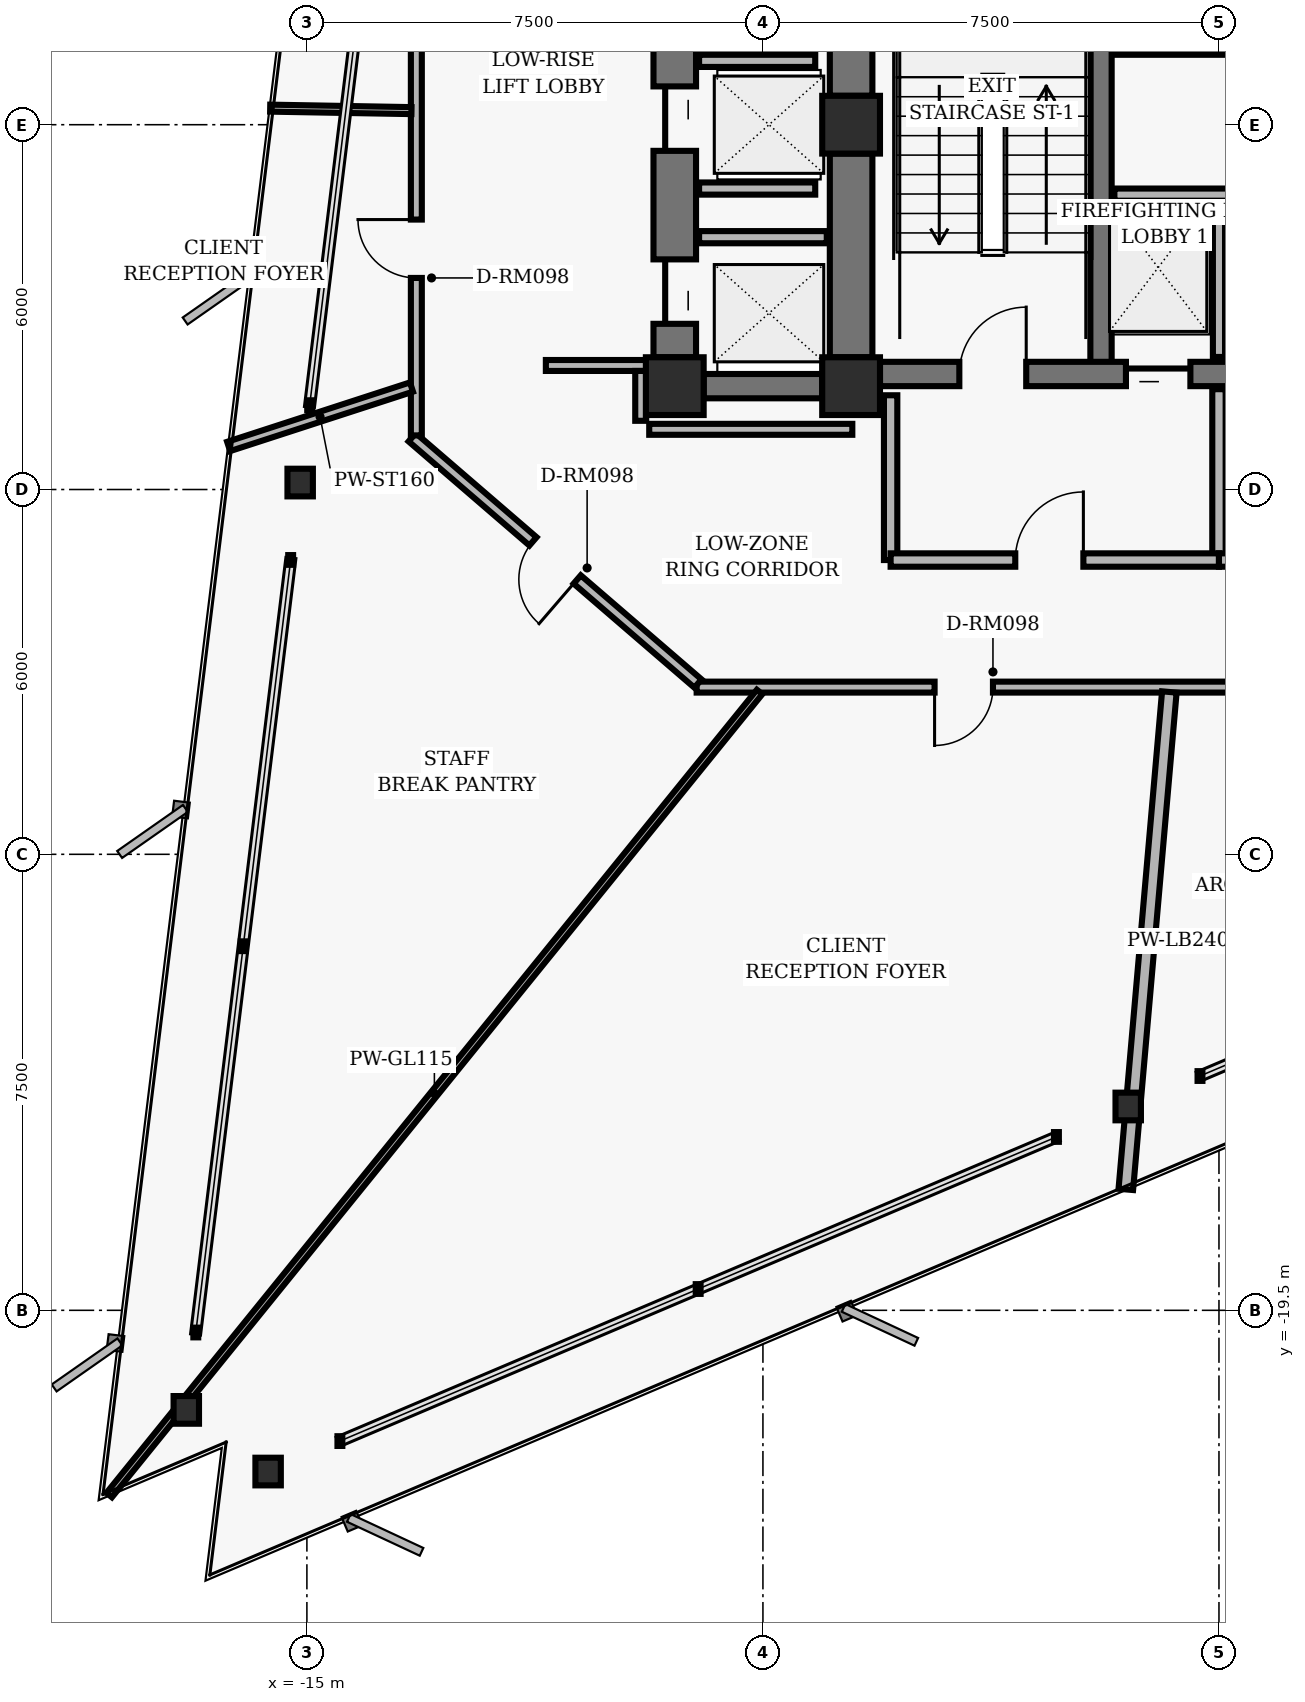
"""IFC4 building model, lengths in metres.
Left out: names, types, materials, properties, quantities, classifications, styles, units other than length and angle.
Written with IfcOpenShell. Run it as: python <this file> out.ifc"""

import sys

from ifc_helpers import new_model, si_unit, direction, frame, frame_2d, origin, origin_2d, place, context, subcontext, project, spatial, rectangle, hollow_rectangle, i_section, extrude, element, fill, save


model = new_model("IFC4")
c1 = context("Model", 3, precision=1e-05, world=origin(), true_north=direction((0.0, 1.0)))
c2 = subcontext(c1, "Body", "Model", "MODEL_VIEW")
j1 = project(units=[si_unit("LENGTHUNIT", "METRE"), si_unit("PLANEANGLEUNIT", "RADIAN")], contexts=[c1])
p1 = place(None, origin())
s1 = spatial("IfcSite", under=j1, at=p1, CompositionType="ELEMENT")
p2 = place(p1, origin())
s2 = spatial("IfcBuilding", under=s1, at=p2, CompositionType="ELEMENT")
p3 = place(p2, frame((0.0, 0.0, 63.04)))
s3 = spatial("IfcBuildingStorey", under=s2, at=p3, CompositionType="ELEMENT", Elevation=63.04)
for number, where, z_axis, x_axis in (
    (1, (-6.05, 0.0, 0.0), (0.0, 0.0, 1.0), (1.0, 0.0, 0.0)),
    (2, (-6.05, -4.3, 0.0), (0.0, 0.0, 1.0), (1.0, 0.0, 0.0)),
    (3, (-8.95, -4.3, 0.0), (0.0, 0.0, 1.0), (1.0, 0.0, 0.0)),
):
    element("IfcColumn", number, at=place(p3, frame(where, z_axis=z_axis, x_axis=x_axis)), inside=s3, PredefinedType="COLUMN", context=c2, shape_type="SweptSolid", body=[
        extrude(hollow_rectangle(XDim=0.95, YDim=0.95, WallThickness=0.06, InnerFilletRadius=0.02, OuterFilletRadius=0.04, at=origin_2d()), origin(), (0.0, 0.0, 1.0), 3.36),
    ])
p4 = place(p3, frame((-6.05, 0.475, 0.0), z_axis=(0.0, 0.0, 1.0), x_axis=(0.0, 1.0, 0.0)))
e4 = element("IfcWall", 4, at=p4, inside=s3, PredefinedType="SHEAR", context=c2, shape_type="SweptSolid", body=[
    extrude(rectangle(XDim=3.55, YDim=0.7, at=frame_2d((1.775, 0.0))), origin(), (0.0, 0.0, 1.0), 3.098),
])
p5 = place(p3, frame((-6.05, -3.825, 0.0), z_axis=(0.0, 0.0, 1.0), x_axis=(0.0, 1.0, 0.0)))
e5 = element("IfcWall", 5, at=p5, inside=s3, PredefinedType="SHEAR", context=c2, shape_type="SweptSolid", body=[
    extrude(rectangle(XDim=3.35, YDim=0.7, at=frame_2d((1.675, 0.0))), origin(), (0.0, 0.0, 1.0), 3.098),
])
p6 = place(p3, frame((-1.94, -4.1, 0.0), z_axis=(0.0, 0.0, 1.0), x_axis=(0.0, 1.0, 0.0)))
e6 = element("IfcWall", 6, at=p6, inside=s3, PredefinedType="SHEAR", context=c2, shape_type="SweptSolid", body=[
    extrude(rectangle(XDim=8.2, YDim=0.35, at=frame_2d((4.1, 0.0))), origin(), (0.0, 0.0, 1.0), 3.098),
])
p7 = place(p3, frame((-5.575, -4.1, 0.0), z_axis=(0.0, 0.0, 1.0), x_axis=(1.0, 0.0, 0.0)))
e7 = element("IfcWall", 7, at=p7, inside=s3, PredefinedType="SHEAR", context=c2, shape_type="SweptSolid", body=[
    extrude(rectangle(XDim=11.15, YDim=0.4, at=frame_2d((5.575, 0.0))), origin(), (0.0, 0.0, 1.0), 3.098),
])
p8 = place(p7, frame((1.305, 0.0, 0.0)))
e8 = element("IfcOpeningElement", 8, at=p8, cuts=e7, PredefinedType="OPENING", context=c2, shape_type="SweptSolid", body=[
    extrude(rectangle(XDim=1.1, YDim=2.04, at=frame_2d((0.55, 1.02))), frame((0.0, 0.21, 0.0), z_axis=(0.0, -1.0, 0.0), x_axis=(1.0, 0.0, 0.0)), (0.0, 0.0, 1.0), 0.42),
])
p9 = place(p7, frame((8.745, 0.0, 0.0)))
e9 = element("IfcOpeningElement", 9, at=p9, cuts=e7, PredefinedType="OPENING", context=c2, shape_type="SweptSolid", body=[
    extrude(rectangle(XDim=1.1, YDim=2.04, at=frame_2d((0.55, 1.02))), frame((0.0, 0.21, 0.0), z_axis=(0.0, -1.0, 0.0), x_axis=(1.0, 0.0, 0.0)), (0.0, 0.0, 1.0), 0.42),
])
p10 = place(p7, frame((4.045, 0.0, 0.0)))
e10 = element("IfcOpeningElement", 10, at=p10, cuts=e7, PredefinedType="OPENING", context=c2, shape_type="SweptSolid", body=[
    extrude(rectangle(XDim=1.06, YDim=2.04, at=frame_2d((0.53, 1.02))), frame((0.0, 0.21, 0.0), z_axis=(0.0, -1.0, 0.0), x_axis=(1.0, 0.0, 0.0)), (0.0, 0.0, 1.0), 0.42),
])
p11 = place(p7, frame((6.045, 0.0, 0.0)))
e11 = element("IfcOpeningElement", 11, at=p11, cuts=e7, PredefinedType="OPENING", context=c2, shape_type="SweptSolid", body=[
    extrude(rectangle(XDim=1.06, YDim=2.04, at=frame_2d((0.53, 1.02))), frame((0.0, 0.21, 0.0), z_axis=(0.0, -1.0, 0.0), x_axis=(1.0, 0.0, 0.0)), (0.0, 0.0, 1.0), 0.42),
])
p12 = place(p3, frame((-8.95, -3.825, 0.0), z_axis=(0.0, 0.0, 1.0), x_axis=(0.0, 1.0, 0.0)))
e12 = element("IfcWall", 12, at=p12, inside=s3, PredefinedType="SHEAR", context=c2, shape_type="SweptSolid", body=[
    extrude(rectangle(XDim=7.85, YDim=0.7, at=frame_2d((3.925, 0.0))), origin(), (0.0, 0.0, 1.0), 3.098),
])
p13 = place(p12, frame((0.55, 0.0, 0.0)))
e13 = element("IfcOpeningElement", 13, at=p13, cuts=e12, PredefinedType="OPENING", context=c2, shape_type="SweptSolid", body=[
    extrude(rectangle(XDim=1.06, YDim=2.04, at=frame_2d((0.53, 1.02))), frame((0.0, 0.36, 0.0), z_axis=(0.0, -1.0, 0.0), x_axis=(1.0, 0.0, 0.0)), (0.0, 0.0, 1.0), 0.72),
])
p14 = place(p12, frame((3.395, 0.0, 0.0)))
e14 = element("IfcOpeningElement", 14, at=p14, cuts=e12, PredefinedType="OPENING", context=c2, shape_type="SweptSolid", body=[
    extrude(rectangle(XDim=1.06, YDim=2.04, at=frame_2d((0.53, 1.02))), frame((0.0, 0.36, 0.0), z_axis=(0.0, -1.0, 0.0), x_axis=(1.0, 0.0, 0.0)), (0.0, 0.0, 1.0), 0.72),
])
p15 = place(p12, frame((6.23, 0.0, 0.0)))
e15 = element("IfcOpeningElement", 15, at=p15, cuts=e12, PredefinedType="OPENING", context=c2, shape_type="SweptSolid", body=[
    extrude(rectangle(XDim=1.06, YDim=2.04, at=frame_2d((0.53, 1.02))), frame((0.0, 0.36, 0.0), z_axis=(0.0, -1.0, 0.0), x_axis=(1.0, 0.0, 0.0)), (0.0, 0.0, 1.0), 0.72),
])
p16 = place(p3, frame((-8.475, -4.3, 0.0), z_axis=(0.0, 0.0, 1.0), x_axis=(1.0, 0.0, 0.0)))
e16 = element("IfcWall", 16, at=p16, inside=s3, PredefinedType="SHEAR", context=c2, shape_type="SweptSolid", body=[
    extrude(rectangle(XDim=1.95, YDim=0.4, at=frame_2d((0.975, 0.0))), origin(), (0.0, 0.0, 1.0), 3.098),
])
for number, where, z_axis, x_axis in (
    (17, (-15.111, -5.886, 0.0), (0.0, 0.0, 1.0), (1.0, 0.0, 0.0)),
    (18, (-16.983, -21.138, 0.0), (0.0, 0.0, 1.0), (1.0, 0.0, 0.0)),
    (19, (-15.638, -22.152, 0.0), (0.0, 0.0, 1.0), (1.0, 0.0, 0.0)),
    (20, (-1.493, -16.148, 0.0), (0.0, 0.0, 1.0), (1.0, 0.0, 0.0)),
):
    element("IfcColumn", number, at=place(p3, frame(where, z_axis=z_axis, x_axis=x_axis)), inside=s3, PredefinedType="COLUMN", context=c2, shape_type="SweptSolid", body=[
        extrude(i_section(OverallWidth=0.418, OverallDepth=0.455, WebThickness=0.042, FlangeThickness=0.068, FilletRadius=0.025, at=origin_2d()), origin(), (0.0, 0.0, 1.0), 3.36),
    ])
p17 = place(p3, frame((0.0, -3.82, 0.0), z_axis=(0.0, 0.0, 1.0), x_axis=(0.0, 1.0, 0.0)))
e21 = element("IfcWall", 21, at=p17, inside=s3, PredefinedType="PARTITIONING", context=c2, shape_type="SweptSolid", body=[
    extrude(rectangle(XDim=2.67, YDim=0.2, at=frame_2d((1.335, 0.0))), origin(), (0.0, 0.0, 1.0), 3.073),
])
p18 = place(p3, frame((-1.72, -1.15, 0.0), z_axis=(0.0, 0.0, 1.0), x_axis=(1.0, 0.0, 0.0)))
e22 = element("IfcWall", 22, at=p18, inside=s3, PredefinedType="PARTITIONING", context=c2, shape_type="SweptSolid", body=[
    extrude(rectangle(XDim=3.44, YDim=0.2, at=frame_2d((1.72, 0.0))), origin(), (0.0, 0.0, 1.0), 3.073),
])
p19 = place(p3, frame((-5.4, -7.16, 0.0), z_axis=(0.0, 0.0, 1.0), x_axis=(0.0, 1.0, 0.0)))
e23 = element("IfcWall", 23, at=p19, inside=s3, PredefinedType="PARTITIONING", context=c2, shape_type="SweptSolid", body=[
    extrude(rectangle(XDim=2.71, YDim=0.22, at=frame_2d((1.355, 0.0))), origin(), (0.0, 0.0, 1.0), 3.073),
])
p20 = place(p3, frame((0.0, -7.16, 0.0), z_axis=(0.0, 0.0, 1.0), x_axis=(0.0, 1.0, 0.0)))
e24 = element("IfcWall", 24, at=p20, inside=s3, PredefinedType="PARTITIONING", context=c2, shape_type="SweptSolid", body=[
    extrude(rectangle(XDim=2.81, YDim=0.22, at=frame_2d((1.405, 0.0))), origin(), (0.0, 0.0, 1.0), 3.073),
])
p21 = place(p3, frame((-5.4, -7.16, 0.0), z_axis=(0.0, 0.0, 1.0), x_axis=(1.0, 0.0, 0.0)))
e25 = element("IfcWall", 25, at=p21, inside=s3, PredefinedType="PARTITIONING", context=c2, shape_type="SweptSolid", body=[
    extrude(rectangle(XDim=5.4, YDim=0.22, at=frame_2d((2.7, 0.0))), origin(), (0.0, 0.0, 1.0), 2.587),
])
p22 = place(p21, frame((2.05, 0.0, 0.0)))
e26 = element("IfcOpeningElement", 26, at=p22, cuts=e25, PredefinedType="OPENING", context=c2, shape_type="SweptSolid", body=[
    extrude(rectangle(XDim=1.12, YDim=2.02, at=frame_2d((0.56, 1.01))), frame((0.0, 0.12, 0.0), z_axis=(0.0, -1.0, 0.0), x_axis=(1.0, 0.0, 0.0)), (0.0, 0.0, 1.0), 0.24),
])
p23 = place(p3, frame((0.0, -7.16, 0.0), z_axis=(0.0, 0.0, 1.0), x_axis=(1.0, 0.0, 0.0)))
e27 = element("IfcWall", 27, at=p23, inside=s3, PredefinedType="PARTITIONING", context=c2, shape_type="SweptSolid", body=[
    extrude(rectangle(XDim=5.4, YDim=0.22, at=frame_2d((2.7, 0.0))), origin(), (0.0, 0.0, 1.0), 2.587),
])
p24 = place(p23, frame((2.05, 0.0, 0.0)))
e28 = element("IfcOpeningElement", 28, at=p24, cuts=e27, PredefinedType="OPENING", context=c2, shape_type="SweptSolid", body=[
    extrude(rectangle(XDim=1.12, YDim=2.02, at=frame_2d((0.56, 1.01))), frame((0.0, 0.12, 0.0), z_axis=(0.0, -1.0, 0.0), x_axis=(1.0, 0.0, 0.0)), (0.0, 0.0, 1.0), 0.24),
])
p25 = place(p3, frame((-1.72, 1.25, 0.0), z_axis=(0.0, 0.0, 1.0), x_axis=(1.0, 0.0, 0.0)))
e29 = element("IfcWall", 29, at=p25, inside=s3, PredefinedType="PARTITIONING", context=c2, shape_type="SweptSolid", body=[
    extrude(rectangle(XDim=3.44, YDim=0.2, at=frame_2d((1.72, 0.0))), origin(), (0.0, 0.0, 1.0), 3.073),
])
p26 = place(p3, frame((-8.55, -1.85, 0.0), z_axis=(0.0, 0.0, 1.0), x_axis=(1.0, 0.0, 0.0)))
e30 = element("IfcWall", 30, at=p26, inside=s3, PredefinedType="PARTITIONING", context=c2, shape_type="SweptSolid", body=[
    extrude(rectangle(XDim=2.1, YDim=0.2, at=frame_2d((1.05, 0.0))), origin(), (0.0, 0.0, 1.0), 3.073),
])
for number, where, z_axis, x_axis in (
    (31, (-8.55, -1.05, 0.0), (0.0, 0.0, 1.0), (1.0, 0.0, 0.0)),
    (32, (-8.55, 1.05, 0.0), (0.0, 0.0, 1.0), (1.0, 0.0, 0.0)),
):
    element("IfcWall", number, at=place(p3, frame(where, z_axis=z_axis, x_axis=x_axis)), inside=s3, PredefinedType="PARTITIONING", context=c2, shape_type="SweptSolid", body=[
        extrude(rectangle(XDim=1.91, YDim=0.2, at=frame_2d((0.955, 0.0))), origin(), (0.0, 0.0, 1.0), 3.073),
    ])
p27 = place(p3, frame((8.41, -9.25, 0.0), z_axis=(0.0, 0.0, 1.0), x_axis=(-1.0, 0.0, 0.0)))
e33 = element("IfcWall", 33, at=p27, inside=s3, PredefinedType="PARTITIONING", context=c2, shape_type="SweptSolid", body=[
    extrude(rectangle(XDim=17.0, YDim=0.18, at=frame_2d((8.5, 0.0))), origin(), (0.0, 0.0, 1.0), 2.587),
])
p28 = place(p27, frame((12.127, 0.0, 0.0)))
e34 = element("IfcOpeningElement", 34, at=p28, cuts=e33, PredefinedType="OPENING", context=c2, shape_type="SweptSolid", body=[
    extrude(rectangle(XDim=0.96, YDim=2.02, at=frame_2d((0.48, 1.01))), frame((0.0, 0.1, 0.0), z_axis=(0.0, -1.0, 0.0), x_axis=(1.0, 0.0, 0.0)), (0.0, 0.0, 1.0), 0.2),
])
p29 = place(p27, frame((5.75, 0.0, 0.0)))
e35 = element("IfcOpeningElement", 35, at=p29, cuts=e33, PredefinedType="OPENING", context=c2, shape_type="SweptSolid", body=[
    extrude(rectangle(XDim=0.96, YDim=2.02, at=frame_2d((0.48, 1.01))), frame((0.0, 0.1, 0.0), z_axis=(0.0, -1.0, 0.0), x_axis=(1.0, 0.0, 0.0)), (0.0, 0.0, 1.0), 0.2),
])
p30 = place(p3, frame((-8.568, -9.191, 0.0), z_axis=(0.0, 0.0, 1.0), x_axis=(-0.757556899173, 0.652769135694, 0.0)))
e36 = element("IfcWall", 36, at=p30, inside=s3, PredefinedType="PARTITIONING", context=c2, shape_type="SweptSolid", body=[
    extrude(rectangle(XDim=6.204, YDim=0.18, at=frame_2d((3.102, 0.0))), origin(), (0.0, 0.0, 1.0), 3.073),
])
p31 = place(p30, frame((2.622, 0.0, 0.0)))
e37 = element("IfcOpeningElement", 37, at=p31, cuts=e36, PredefinedType="OPENING", context=c2, shape_type="SweptSolid", body=[
    extrude(rectangle(XDim=0.96, YDim=2.02, at=frame_2d((0.48, 1.01))), frame((0.0, 0.1, 0.0), z_axis=(0.0, -1.0, 0.0), x_axis=(1.0, 0.0, 0.0)), (0.0, 0.0, 1.0), 0.2),
])
p32 = place(p3, frame((-13.2, -5.11, 0.0), z_axis=(0.0, 0.0, 1.0), x_axis=(0.0, 1.0, 0.0)))
e38 = element("IfcWall", 38, at=p32, inside=s3, PredefinedType="PARTITIONING", context=c2, shape_type="SweptSolid", body=[
    extrude(rectangle(XDim=10.22, YDim=0.18, at=frame_2d((5.11, 0.0))), origin(), (0.0, 0.0, 1.0), 2.587),
])
p33 = place(p32, frame((2.59, 0.0, 0.0)))
e39 = element("IfcOpeningElement", 39, at=p33, cuts=e38, PredefinedType="OPENING", context=c2, shape_type="SweptSolid", body=[
    extrude(rectangle(XDim=0.96, YDim=2.02, at=frame_2d((0.48, 1.01))), frame((0.0, 0.1, 0.0), z_axis=(0.0, -1.0, 0.0), x_axis=(1.0, 0.0, 0.0)), (0.0, 0.0, 1.0), 0.2),
])
p34 = place(p32, frame((7.171, 0.0, 0.0)))
e40 = element("IfcOpeningElement", 40, at=p34, cuts=e38, PredefinedType="OPENING", context=c2, shape_type="SweptSolid", body=[
    extrude(rectangle(XDim=0.96, YDim=2.02, at=frame_2d((0.48, 1.01))), frame((0.0, 0.1, 0.0), z_axis=(0.0, -1.0, 0.0), x_axis=(1.0, 0.0, 0.0)), (0.0, 0.0, 1.0), 0.2),
])
p35 = place(p3, frame((-11.07, -3.96, 0.0), z_axis=(0.0, 0.0, 1.0), x_axis=(1.0, 0.0, 0.0)))
e41 = element("IfcWall", 41, at=p35, inside=s3, PredefinedType="PARTITIONING", context=c2, shape_type="SweptSolid", body=[
    extrude(rectangle(XDim=1.65, YDim=0.18, at=frame_2d((0.825, 0.0))), origin(), (0.0, 0.0, 1.0), 3.073),
])
p36 = place(p3, frame((-9.51, -4.05, 0.0), z_axis=(0.0, 0.0, 1.0), x_axis=(0.0, -1.0, 0.0)))
e42 = element("IfcWall", 42, at=p36, inside=s3, PredefinedType="PARTITIONING", context=c2, shape_type="SweptSolid", body=[
    extrude(rectangle(XDim=0.82, YDim=0.18, at=frame_2d((0.41, 0.0))), origin(), (0.0, 0.0, 1.0), 3.073),
])
p37 = place(p3, frame((-9.37, -5.01, 0.0), z_axis=(0.0, 0.0, 1.0), x_axis=(1.0, 0.0, 0.0)))
e43 = element("IfcWall", 43, at=p37, inside=s3, PredefinedType="PARTITIONING", context=c2, shape_type="SweptSolid", body=[
    extrude(rectangle(XDim=3.34, YDim=0.18, at=frame_2d((1.67, 0.0))), origin(), (0.0, 0.0, 1.0), 3.073),
])
p38 = place(p3, frame((-13.28, -4.315, 0.0), z_axis=(0.0, 0.0, 1.0), x_axis=(-0.951057330934, -0.309014487164, 0.0)))
e44 = element("IfcWall", 44, at=p38, inside=s3, PredefinedType="PARTITIONING", context=c2, shape_type="SweptSolid", body=[
    extrude(rectangle(XDim=3.162, YDim=0.16, at=frame_2d((1.581, 0.0))), origin(), (0.0, 0.0, 1.0), 3.073),
])
p39 = place(p3, frame((-7.555, -9.33, 0.0), z_axis=(0.0, 0.0, 1.0), x_axis=(-0.629320948329, -0.777145510181, 0.0)))
e45 = element("IfcWall", 45, at=p39, inside=s3, PredefinedType="MOVABLE", context=c2, shape_type="SweptSolid", body=[
    extrude(rectangle(XDim=16.996, YDim=0.115, at=frame_2d((8.498, 0.0))), origin(), (0.0, 0.0, 1.0), 2.358),
])
p40 = place(p3, frame((-0.816, -9.33, 0.0), z_axis=(0.0, 0.0, 1.0), x_axis=(-0.087131179551, -0.996196846788, 0.0)))
e46 = element("IfcWall", 46, at=p40, inside=s3, PredefinedType="PARTITIONING", context=c2, shape_type="SweptSolid", body=[
    extrude(rectangle(XDim=8.213, YDim=0.24, at=frame_2d((4.106, 0.0))), origin(), (0.0, 0.0, 1.0), 3.073),
])
p41 = place(p3, frame((-13.28, 0.232, 0.0), z_axis=(0.0, 0.0, 1.0), x_axis=(-0.999846109686, 0.017543002765, 0.0)))
e47 = element("IfcWall", 47, at=p41, inside=s3, PredefinedType="MOVABLE", context=c2, shape_type="SweptSolid", body=[
    extrude(rectangle(XDim=2.324, YDim=0.115, at=frame_2d((1.162, 0.0))), origin(), (0.0, 0.0, 1.0), 3.073),
])
p42 = place(p8, origin())
e48 = element("IfcDoor", 48, at=p42, inside=s3, OperationType="SINGLE_SWING_RIGHT", PredefinedType="DOOR", context=c2, shape_type="SweptSolid", body=[
    extrude(rectangle(XDim=1.1, YDim=2.04, at=frame_2d((0.55, 1.02))), frame((0.0, 0.025, 0.0), z_axis=(0.0, -1.0, 0.0), x_axis=(1.0, 0.0, 0.0)), (0.0, 0.0, 1.0), 0.05),
])
fill(e8, e48)
p43 = place(p10, origin())
e49 = element("IfcDoor", 49, at=p43, inside=s3, OperationType="SLIDING_TO_LEFT", PredefinedType="DOOR", context=c2, shape_type="SweptSolid", body=[
    extrude(rectangle(XDim=1.06, YDim=2.04, at=frame_2d((0.53, 1.02))), frame((0.0, 0.025, 0.0), z_axis=(0.0, -1.0, 0.0), x_axis=(1.0, 0.0, 0.0)), (0.0, 0.0, 1.0), 0.05),
])
fill(e10, e49)
p44 = place(p22, origin())
e50 = element("IfcDoor", 50, at=p44, inside=s3, OperationType="SINGLE_SWING_RIGHT", PredefinedType="DOOR", context=c2, shape_type="SweptSolid", body=[
    extrude(rectangle(XDim=1.12, YDim=2.02, at=frame_2d((0.56, 1.01))), frame((0.0, 0.025, 0.0), z_axis=(0.0, -1.0, 0.0), x_axis=(1.0, 0.0, 0.0)), (0.0, 0.0, 1.0), 0.05),
])
fill(e26, e50)
p45 = place(p13, origin())
e51 = element("IfcDoor", 51, at=p45, inside=s3, OperationType="SLIDING_TO_LEFT", PredefinedType="DOOR", context=c2, shape_type="SweptSolid", body=[
    extrude(rectangle(XDim=1.06, YDim=2.04, at=frame_2d((0.53, 1.02))), frame((0.0, 0.025, 0.0), z_axis=(0.0, -1.0, 0.0), x_axis=(1.0, 0.0, 0.0)), (0.0, 0.0, 1.0), 0.05),
])
fill(e13, e51)
p46 = place(p14, origin())
e52 = element("IfcDoor", 52, at=p46, inside=s3, OperationType="SLIDING_TO_RIGHT", PredefinedType="DOOR", context=c2, shape_type="SweptSolid", body=[
    extrude(rectangle(XDim=1.06, YDim=2.04, at=frame_2d((0.53, 1.02))), frame((0.0, 0.025, 0.0), z_axis=(0.0, -1.0, 0.0), x_axis=(1.0, 0.0, 0.0)), (0.0, 0.0, 1.0), 0.05),
])
fill(e14, e52)
p47 = place(p33, origin())
e53 = element("IfcDoor", 53, at=p47, inside=s3, OperationType="SINGLE_SWING_RIGHT", PredefinedType="DOOR", context=c2, shape_type="SweptSolid", body=[
    extrude(rectangle(XDim=0.96, YDim=2.02, at=frame_2d((0.48, 1.01))), frame((0.0, 0.025, 0.0), z_axis=(0.0, -1.0, 0.0), x_axis=(1.0, 0.0, 0.0)), (0.0, 0.0, 1.0), 0.05),
])
fill(e39, e53)
p48 = place(p31, origin())
e54 = element("IfcDoor", 54, at=p48, inside=s3, OperationType="SINGLE_SWING_LEFT", PredefinedType="DOOR", context=c2, shape_type="SweptSolid", body=[
    extrude(rectangle(XDim=0.96, YDim=2.02, at=frame_2d((0.48, 1.01))), frame((0.0, 0.025, 0.0), z_axis=(0.0, -1.0, 0.0), x_axis=(1.0, 0.0, 0.0)), (0.0, 0.0, 1.0), 0.05),
])
fill(e37, e54)
p49 = place(p28, origin())
e55 = element("IfcDoor", 55, at=p49, inside=s3, OperationType="SINGLE_SWING_RIGHT", PredefinedType="DOOR", context=c2, shape_type="SweptSolid", body=[
    extrude(rectangle(XDim=0.96, YDim=2.02, at=frame_2d((0.48, 1.01))), frame((0.0, 0.025, 0.0), z_axis=(0.0, -1.0, 0.0), x_axis=(1.0, 0.0, 0.0)), (0.0, 0.0, 1.0), 0.05),
])
fill(e34, e55)
save(model, sys.argv[1])
